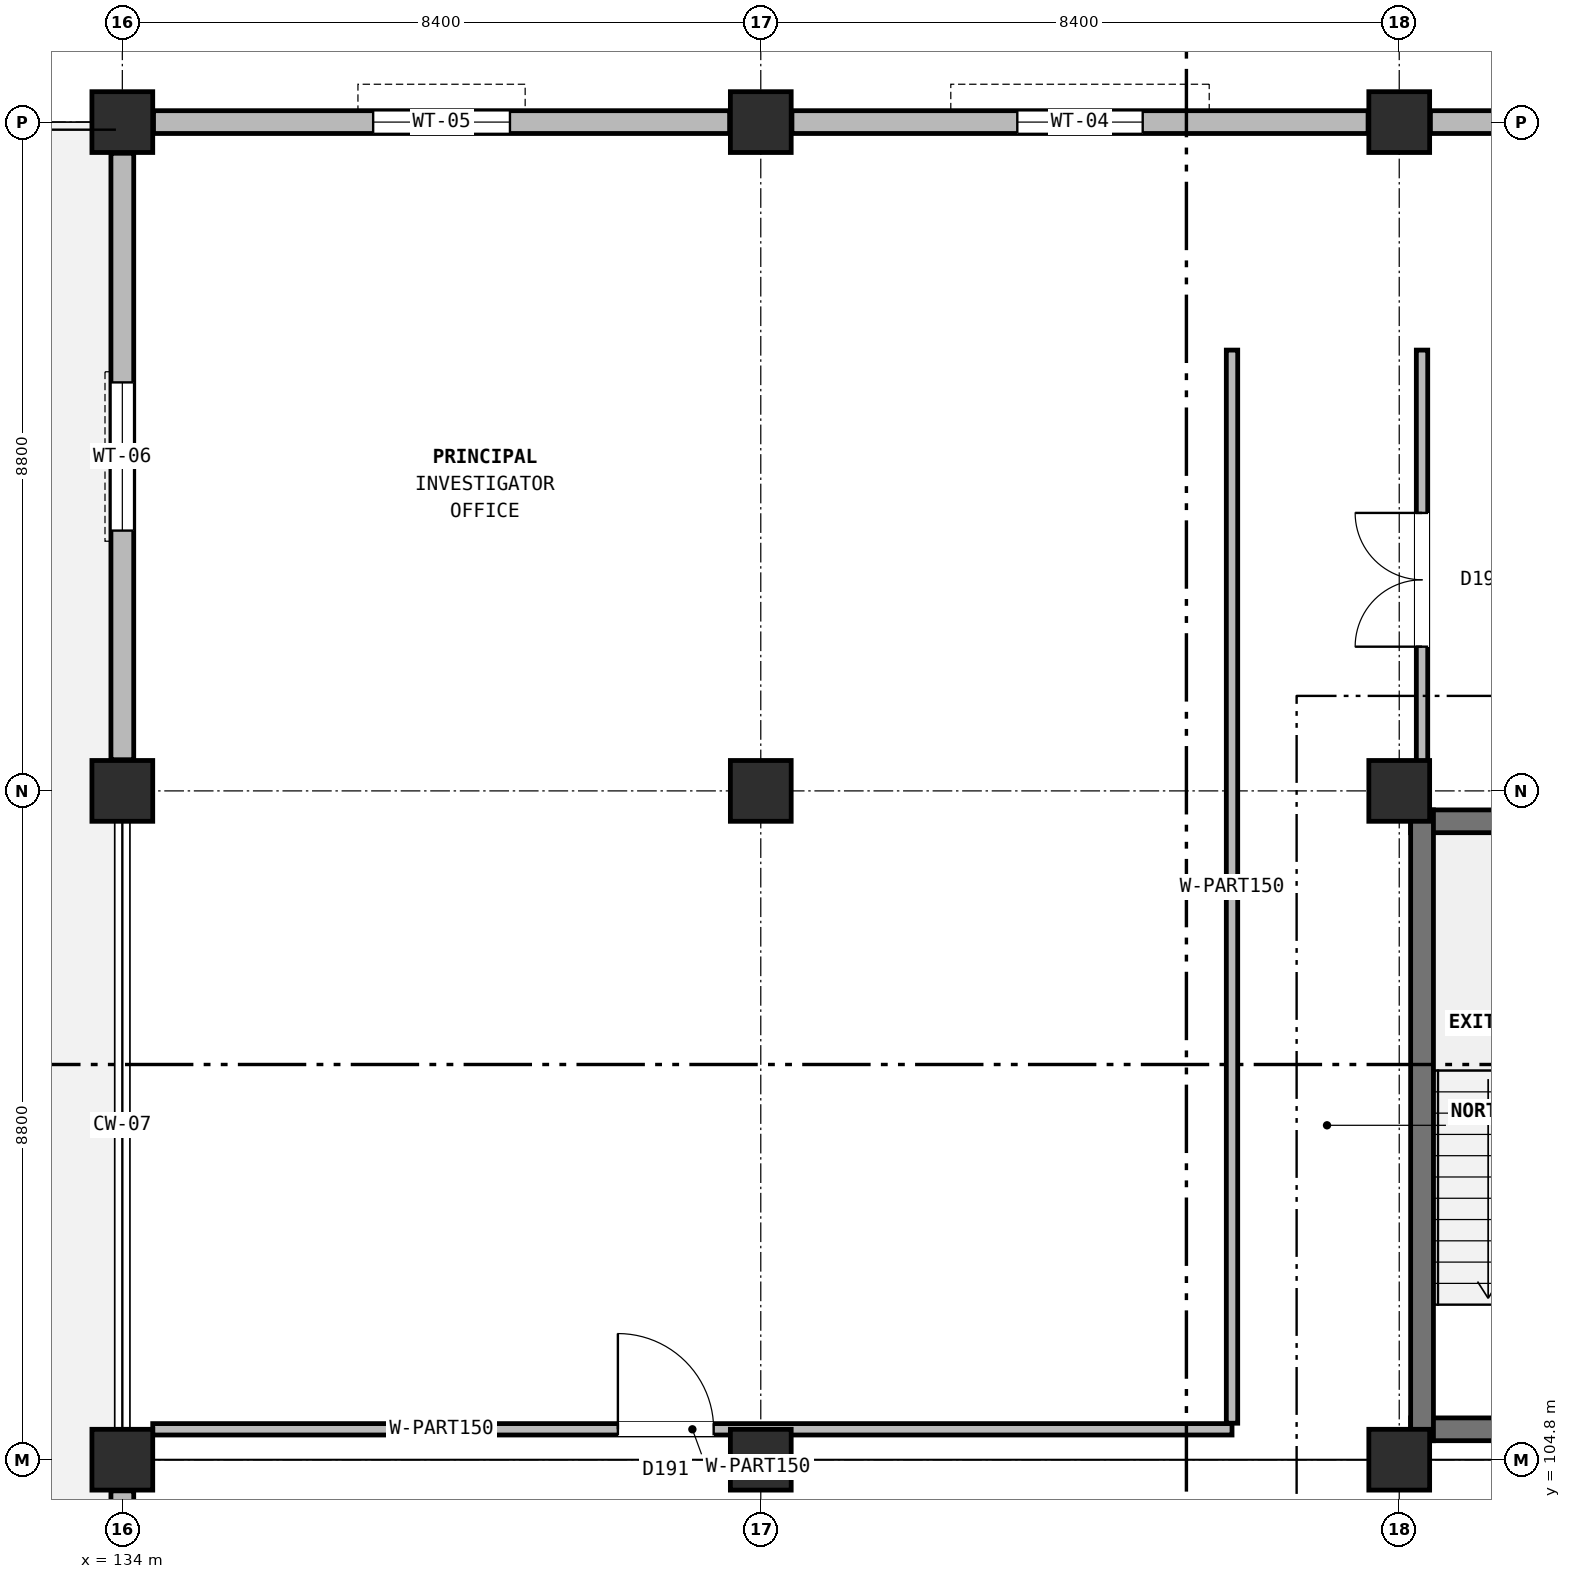
"""IFC4 building model, lengths in metres.
Left out: names, types, materials, properties, quantities, classifications, styles, units other than length and angle.
Written with IfcOpenShell. Run it as: python <this file> out.ifc"""

import sys

from ifc_helpers import new_model, si_unit, direction, frame, frame_2d, origin, origin_2d, place, context, subcontext, project, spatial, rectangle, extrude, element, fill, save


model = new_model("IFC4")
c1 = context("Model", 3, precision=1e-05, world=origin(), true_north=direction((0.0, 1.0)))
c2 = subcontext(c1, "Body", "Model", "MODEL_VIEW")
j1 = project(units=[si_unit("LENGTHUNIT", "METRE"), si_unit("PLANEANGLEUNIT", "RADIAN")], contexts=[c1])
p1 = place(None, origin())
s1 = spatial("IfcSite", under=j1, at=p1, CompositionType="ELEMENT")
p2 = place(p1, origin())
s2 = spatial("IfcBuilding", under=s1, at=p2, CompositionType="ELEMENT")
p3 = place(p2, frame((0.0, 0.0, 13.2)))
s3 = spatial("IfcBuildingStorey", under=s2, at=p3, CompositionType="ELEMENT", Elevation=13.2)
for number, where, z_axis, x_axis in (
    (1, (134.0, 104.8, 0.0), (0.0, 0.0, 1.0), (1.0, 0.0, 0.0)),
    (2, (134.0, 113.6, 0.0), (0.0, 0.0, 1.0), (1.0, 0.0, 0.0)),
    (3, (134.0, 122.4, 0.0), (0.0, 0.0, 1.0), (1.0, 0.0, 0.0)),
    (4, (142.4, 104.8, 0.0), (0.0, 0.0, 1.0), (1.0, 0.0, 0.0)),
    (5, (142.4, 113.6, 0.0), (0.0, 0.0, 1.0), (1.0, 0.0, 0.0)),
    (6, (142.4, 122.4, 0.0), (0.0, 0.0, 1.0), (1.0, 0.0, 0.0)),
    (7, (150.8, 104.8, 0.0), (0.0, 0.0, 1.0), (1.0, 0.0, 0.0)),
    (8, (150.8, 113.6, 0.0), (0.0, 0.0, 1.0), (1.0, 0.0, 0.0)),
    (9, (150.8, 122.4, 0.0), (0.0, 0.0, 1.0), (1.0, 0.0, 0.0)),
):
    element("IfcColumn", number, at=place(p3, frame(where, z_axis=z_axis, x_axis=x_axis)), inside=s3, PredefinedType="COLUMN", context=c2, shape_type="SweptSolid", body=[
        extrude(rectangle(XDim=0.8, YDim=0.8, at=origin_2d()), origin(), (0.0, 0.0, 1.0), 4.0),
    ])
p4 = place(p3, frame((158.79, 122.4, 0.0), z_axis=(0.0, 0.0, 1.0), x_axis=(-1.0, 0.0, 0.0)))
e10 = element("IfcWall", 10, at=p4, inside=s3, PredefinedType="SOLIDWALL", context=c2, shape_type="SweptSolid", body=[
    extrude(rectangle(XDim=7.58, YDim=0.3, at=frame_2d((3.79, 0.0))), origin(), (0.0, 0.0, 1.0), 3.25),
])
p5 = place(p4, frame((3.04, 0.0, 0.9)))
e11 = element("IfcOpeningElement", 11, at=p5, cuts=e10, PredefinedType="OPENING", context=c2, shape_type="SweptSolid", body=[
    extrude(rectangle(XDim=1.5, YDim=1.8, at=frame_2d((0.75, 0.9))), frame((0.0, 0.16, 0.0), z_axis=(0.0, -1.0, 0.0), x_axis=(1.0, 0.0, 0.0)), (0.0, 0.0, 1.0), 0.32),
])
p6 = place(p3, frame((150.39, 122.4, 0.0), z_axis=(0.0, 0.0, 1.0), x_axis=(-1.0, 0.0, 0.0)))
e12 = element("IfcWall", 12, at=p6, inside=s3, PredefinedType="SOLIDWALL", context=c2, shape_type="SweptSolid", body=[
    extrude(rectangle(XDim=7.58, YDim=0.3, at=frame_2d((3.79, 0.0))), origin(), (0.0, 0.0, 1.0), 3.25),
])
p7 = place(p6, frame((2.965, 0.0, 0.9)))
e13 = element("IfcOpeningElement", 13, at=p7, cuts=e12, PredefinedType="OPENING", context=c2, shape_type="SweptSolid", body=[
    extrude(rectangle(XDim=1.65, YDim=1.85, at=frame_2d((0.825, 0.925))), frame((0.0, 0.16, 0.0), z_axis=(0.0, -1.0, 0.0), x_axis=(1.0, 0.0, 0.0)), (0.0, 0.0, 1.0), 0.32),
])
p8 = place(p3, frame((141.99, 122.4, 0.0), z_axis=(0.0, 0.0, 1.0), x_axis=(-1.0, 0.0, 0.0)))
e14 = element("IfcWall", 14, at=p8, inside=s3, PredefinedType="SOLIDWALL", context=c2, shape_type="SweptSolid", body=[
    extrude(rectangle(XDim=7.58, YDim=0.3, at=frame_2d((3.79, 0.0))), origin(), (0.0, 0.0, 1.0), 3.25),
])
p9 = place(p8, frame((2.89, 0.0, 0.9)))
e15 = element("IfcOpeningElement", 15, at=p9, cuts=e14, PredefinedType="OPENING", context=c2, shape_type="SweptSolid", body=[
    extrude(rectangle(XDim=1.8, YDim=1.9, at=frame_2d((0.9, 0.95))), frame((0.0, 0.16, 0.0), z_axis=(0.0, -1.0, 0.0), x_axis=(1.0, 0.0, 0.0)), (0.0, 0.0, 1.0), 0.32),
])
p10 = place(p3, frame((134.0, 121.99, 0.0), z_axis=(0.0, 0.0, 1.0), x_axis=(0.0, -1.0, 0.0)))
e16 = element("IfcWall", 16, at=p10, inside=s3, PredefinedType="SOLIDWALL", context=c2, shape_type="SweptSolid", body=[
    extrude(rectangle(XDim=7.98, YDim=0.3, at=frame_2d((3.99, 0.0))), origin(), (0.0, 0.0, 1.0), 3.25),
])
p11 = place(p10, frame((3.015, 0.0, 0.9)))
e17 = element("IfcOpeningElement", 17, at=p11, cuts=e16, PredefinedType="OPENING", context=c2, shape_type="SweptSolid", body=[
    extrude(rectangle(XDim=1.95, YDim=1.9, at=frame_2d((0.975, 0.95))), frame((0.0, 0.16, 0.0), z_axis=(0.0, -1.0, 0.0), x_axis=(1.0, 0.0, 0.0)), (0.0, 0.0, 1.0), 0.32),
])
p12 = place(p3, frame((134.0, 104.39, 0.0), z_axis=(0.0, 0.0, 1.0), x_axis=(0.0, -1.0, 0.0)))
e18 = element("IfcWall", 18, at=p12, inside=s3, PredefinedType="SOLIDWALL", context=c2, shape_type="SweptSolid", body=[
    extrude(rectangle(XDim=7.98, YDim=0.3, at=frame_2d((3.99, 0.0))), origin(), (0.0, 0.0, 1.0), 3.25),
])
p13 = place(p12, frame((3.39, 0.0, 0.0)))
e19 = element("IfcOpeningElement", 19, at=p13, cuts=e18, PredefinedType="OPENING", context=c2, shape_type="SweptSolid", body=[
    extrude(rectangle(XDim=1.2, YDim=2.25, at=frame_2d((0.6, 1.125))), frame((0.0, 0.16, 0.0), z_axis=(0.0, -1.0, 0.0), x_axis=(1.0, 0.0, 0.0)), (0.0, 0.0, 1.0), 0.32),
])
for number, where, z_axis, x_axis in (
    (20, (150.95, 105.2, 0.0), (0.0, 0.0, 1.0), (1.0, 0.0, 0.0)),
    (21, (150.95, 113.2, 0.0), (0.0, 0.0, 1.0), (1.0, 0.0, 0.0)),
):
    element("IfcWall", number, at=place(p3, frame(where, z_axis=z_axis, x_axis=x_axis)), inside=s3, PredefinedType="SHEAR", context=c2, shape_type="SweptSolid", body=[
        extrude(rectangle(XDim=3.6, YDim=0.3, at=frame_2d((1.8, 0.0))), origin(), (0.0, 0.0, 1.0), 4.0),
    ])
p14 = place(p3, frame((151.1, 105.05, 0.0), z_axis=(0.0, 0.0, 1.0), x_axis=(0.0, 1.0, 0.0)))
e22 = element("IfcWall", 22, at=p14, inside=s3, PredefinedType="SHEAR", context=c2, shape_type="SweptSolid", body=[
    extrude(rectangle(XDim=8.3, YDim=0.3, at=frame_2d((4.15, 0.0))), origin(), (0.0, 0.0, 1.0), 4.0),
])
p15 = place(p3, frame((134.4, 105.2, 0.0), z_axis=(0.0, 0.0, 1.0), x_axis=(1.0, 0.0, 0.0)))
e23 = element("IfcWall", 23, at=p15, inside=s3, PredefinedType="PARTITIONING", context=c2, shape_type="SweptSolid", body=[
    extrude(rectangle(XDim=14.2, YDim=0.15, at=frame_2d((7.1, 0.0))), origin(), (0.0, 0.0, 1.0), 3.245),
])
p16 = place(p15, frame((6.12, 0.0, 0.0)))
e24 = element("IfcOpeningElement", 24, at=p16, cuts=e23, PredefinedType="OPENING", context=c2, shape_type="SweptSolid", body=[
    extrude(rectangle(XDim=1.26, YDim=2.28, at=frame_2d((0.63, 1.14))), frame((0.0, 0.085, 0.0), z_axis=(0.0, -1.0, 0.0), x_axis=(1.0, 0.0, 0.0)), (0.0, 0.0, 1.0), 0.17),
])
p17 = place(p3, frame((148.6, 105.28, 0.0), z_axis=(0.0, 0.0, 1.0), x_axis=(0.0, 1.0, 0.0)))
e25 = element("IfcWall", 25, at=p17, inside=s3, PredefinedType="PARTITIONING", context=c2, shape_type="SweptSolid", body=[
    extrude(rectangle(XDim=14.12, YDim=0.15, at=frame_2d((7.06, 0.0))), origin(), (0.0, 0.0, 1.0), 3.665),
])
p18 = place(p3, frame((151.1, 113.355, 0.0), z_axis=(0.0, 0.0, 1.0), x_axis=(0.0, 1.0, 0.0)))
e26 = element("IfcWall", 26, at=p18, inside=s3, PredefinedType="PARTITIONING", context=c2, shape_type="SweptSolid", body=[
    extrude(rectangle(XDim=6.045, YDim=0.15, at=frame_2d((3.022, 0.0))), origin(), (0.0, 0.0, 1.0), 3.245),
])
p19 = place(p18, frame((2.143, 0.0, 0.0)))
e27 = element("IfcOpeningElement", 27, at=p19, cuts=e26, PredefinedType="OPENING", context=c2, shape_type="SweptSolid", body=[
    extrude(rectangle(XDim=1.76, YDim=2.36, at=frame_2d((0.88, 1.18))), frame((0.0, 0.085, 0.0), z_axis=(0.0, -1.0, 0.0), x_axis=(1.0, 0.0, 0.0)), (0.0, 0.0, 1.0), 0.17),
])
p20 = place(p7, origin())
e28 = element("IfcWindow", 28, at=p20, inside=s3, PartitioningType="SINGLE_PANEL", PredefinedType="WINDOW", context=c2, shape_type="SweptSolid", body=[
    extrude(rectangle(XDim=1.65, YDim=1.85, at=frame_2d((0.825, 0.925))), frame((0.0, 0.03, 0.0), z_axis=(0.0, -1.0, 0.0), x_axis=(1.0, 0.0, 0.0)), (0.0, 0.0, 1.0), 0.06),
])
fill(e13, e28)
p21 = place(p9, origin())
e29 = element("IfcWindow", 29, at=p21, inside=s3, PartitioningType="SINGLE_PANEL", PredefinedType="WINDOW", context=c2, shape_type="SweptSolid", body=[
    extrude(rectangle(XDim=1.8, YDim=1.9, at=frame_2d((0.9, 0.95))), frame((0.0, 0.03, 0.0), z_axis=(0.0, -1.0, 0.0), x_axis=(1.0, 0.0, 0.0)), (0.0, 0.0, 1.0), 0.06),
])
fill(e15, e29)
p22 = place(p11, origin())
e30 = element("IfcWindow", 30, at=p22, inside=s3, PartitioningType="SINGLE_PANEL", PredefinedType="WINDOW", context=c2, shape_type="SweptSolid", body=[
    extrude(rectangle(XDim=1.95, YDim=1.9, at=frame_2d((0.975, 0.95))), frame((0.0, 0.03, 0.0), z_axis=(0.0, -1.0, 0.0), x_axis=(1.0, 0.0, 0.0)), (0.0, 0.0, 1.0), 0.06),
])
fill(e17, e30)
p23 = place(p16, origin())
e31 = element("IfcDoor", 31, at=p23, inside=s3, OperationType="SINGLE_SWING_LEFT", PredefinedType="DOOR", context=c2, shape_type="SweptSolid", body=[
    extrude(rectangle(XDim=1.26, YDim=2.28, at=frame_2d((0.63, 1.14))), frame((0.0, 0.025, 0.0), z_axis=(0.0, -1.0, 0.0), x_axis=(1.0, 0.0, 0.0)), (0.0, 0.0, 1.0), 0.05),
])
fill(e24, e31)
p24 = place(p19, origin())
e32 = element("IfcDoor", 32, at=p24, inside=s3, OperationType="DOUBLE_DOOR_SINGLE_SWING", PredefinedType="DOOR", context=c2, shape_type="SweptSolid", body=[
    extrude(rectangle(XDim=1.76, YDim=2.36, at=frame_2d((0.88, 1.18))), frame((0.0, 0.025, 0.0), z_axis=(0.0, -1.0, 0.0), x_axis=(1.0, 0.0, 0.0)), (0.0, 0.0, 1.0), 0.05),
])
fill(e27, e32)
save(model, sys.argv[1])
